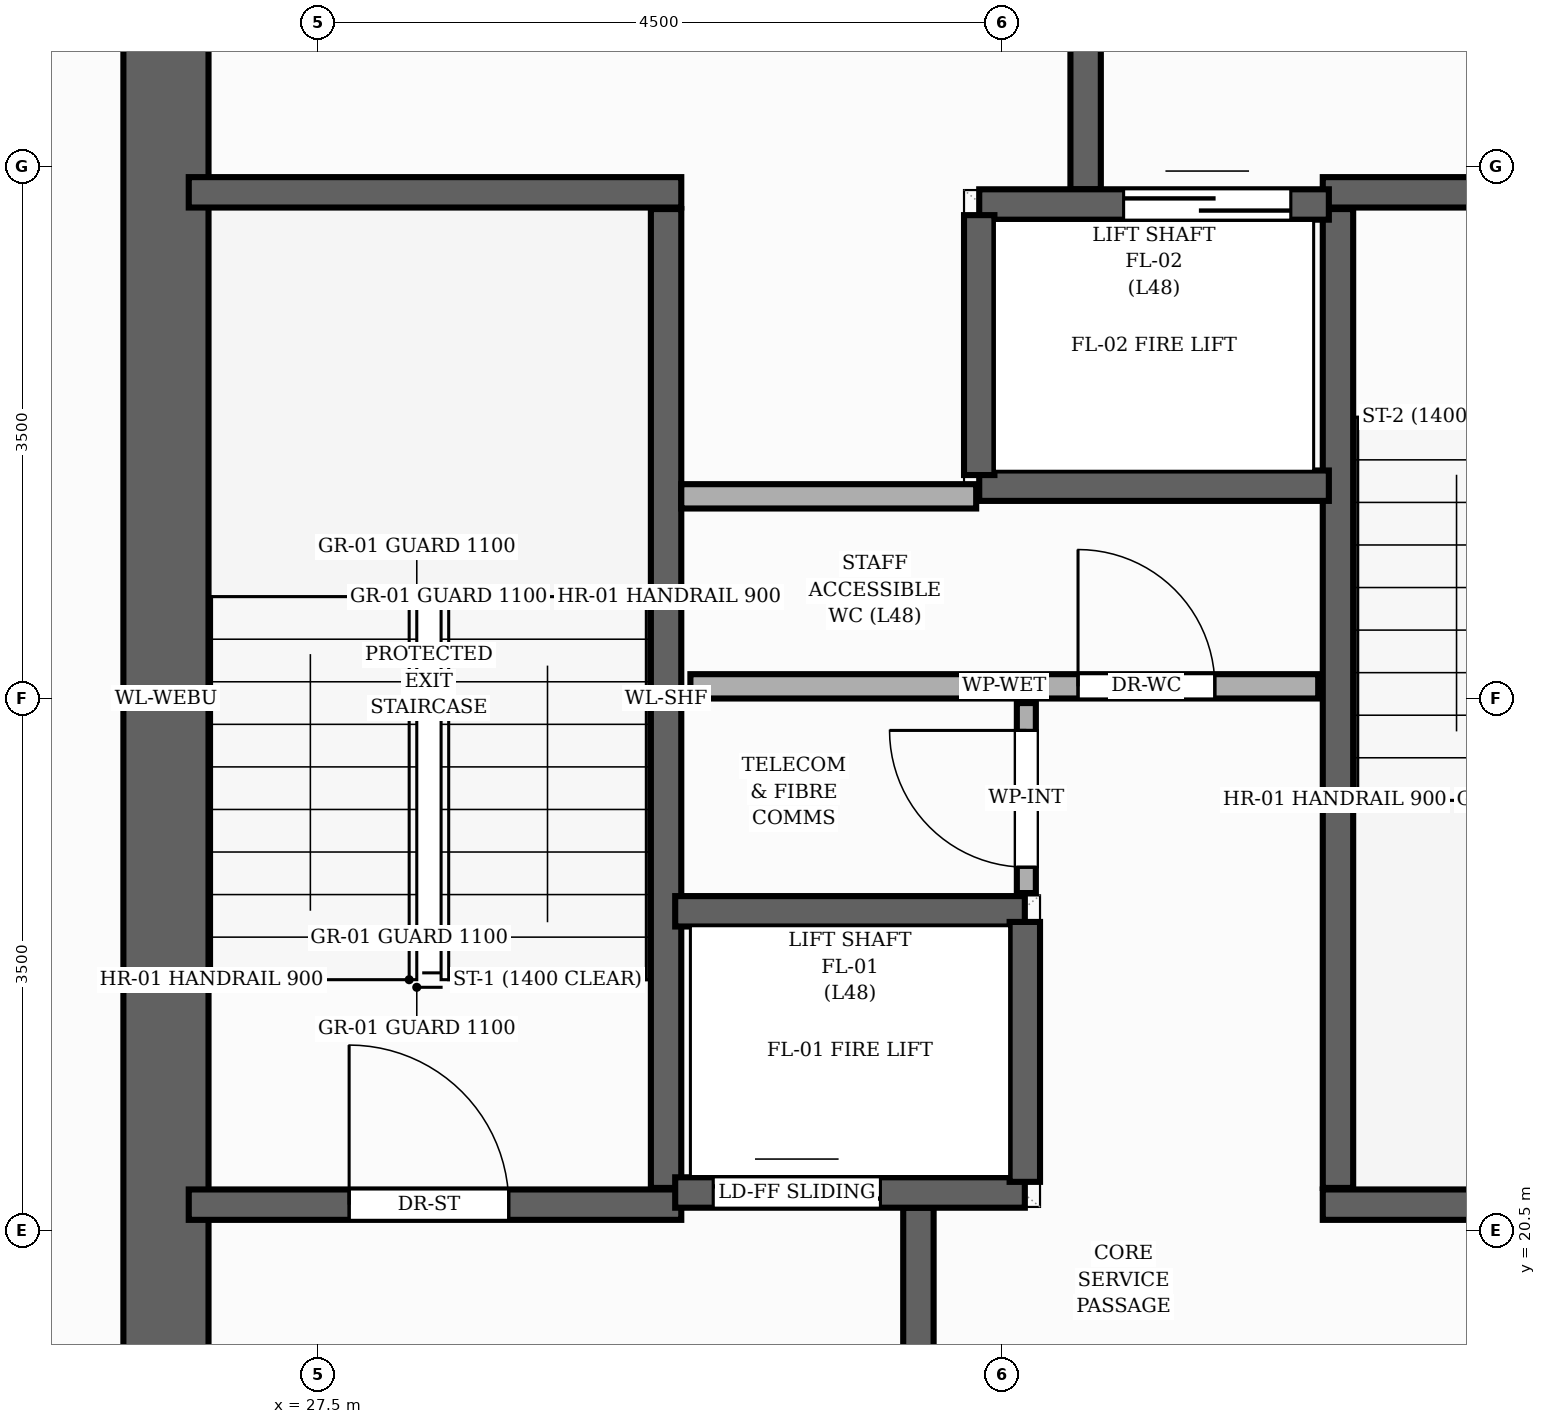
"""IFC4 building model, lengths in metres.
Left out: names, types, materials, properties, quantities, classifications, styles, units other than length and angle.
Written with IfcOpenShell. Run it as: python <this file> out.ifc"""

import sys

from ifc_helpers import new_model, si_unit, direction, frame, frame_2d, origin, place, context, subcontext, project, spatial, rectangle, extrude, element, fill, save


model = new_model("IFC4")
c1 = context("Model", 3, precision=1e-05, world=origin(), true_north=direction((0.0, 1.0)))
c2 = subcontext(c1, "Body", "Model", "MODEL_VIEW")
j1 = project(units=[si_unit("LENGTHUNIT", "METRE"), si_unit("PLANEANGLEUNIT", "RADIAN")], contexts=[c1])
p1 = place(None, origin())
s1 = spatial("IfcSite", under=j1, at=p1, CompositionType="ELEMENT")
p2 = place(p1, origin())
s2 = spatial("IfcBuilding", under=s1, at=p2, CompositionType="ELEMENT")
p3 = place(p2, frame((0.0, 0.0, 163.04)))
s3 = spatial("IfcBuildingStorey", under=s2, at=p3, CompositionType="ELEMENT", Elevation=163.04)
p4 = place(p3, frame((26.5, 17.3, 0.0), z_axis=(0.0, 0.0, 1.0), x_axis=(0.0, 1.0, 0.0)))
e1 = element("IfcWall", 1, at=p4, inside=s3, PredefinedType="SHEAR", context=c2, shape_type="SweptSolid", body=[
    extrude(rectangle(XDim=13.4, YDim=0.56, at=frame_2d((6.7, 0.0))), origin(), (0.0, 0.0, 1.0), 3.2),
])
p5 = place(p3, frame((29.79, 20.78, 0.0), z_axis=(0.0, 0.0, 1.0), x_axis=(0.0, 1.0, 0.0)))
e2 = element("IfcWall", 2, at=p5, inside=s3, PredefinedType="SHEAR", context=c2, shape_type="SweptSolid", body=[
    extrude(rectangle(XDim=6.44, YDim=0.2, at=frame_2d((3.22, 0.0))), origin(), (0.0, 0.0, 1.0), 3.2),
])
p6 = place(p3, frame((26.65, 27.33, 0.0), z_axis=(0.0, 0.0, 1.0), x_axis=(1.0, 0.0, 0.0)))
e3 = element("IfcWall", 3, at=p6, inside=s3, PredefinedType="SHEAR", context=c2, shape_type="SweptSolid", body=[
    extrude(rectangle(XDim=3.24, YDim=0.2, at=frame_2d((1.62, 0.0))), origin(), (0.0, 0.0, 1.0), 3.2),
])
p7 = place(p3, frame((26.65, 20.67, 0.0), z_axis=(0.0, 0.0, 1.0), x_axis=(1.0, 0.0, 0.0)))
e4 = element("IfcWall", 4, at=p7, inside=s3, PredefinedType="SHEAR", context=c2, shape_type="SweptSolid", body=[
    extrude(rectangle(XDim=3.24, YDim=0.2, at=frame_2d((1.62, 0.0))), origin(), (0.0, 0.0, 1.0), 3.2),
])
p8 = place(p7, frame((1.055, 0.0, 0.0)))
e5 = element("IfcOpeningElement", 5, at=p8, cuts=e4, PredefinedType="OPENING", context=c2, shape_type="SweptSolid", body=[
    extrude(rectangle(XDim=1.05, YDim=2.15, at=frame_2d((0.525, 1.075))), frame((0.0, 0.11, 0.0), z_axis=(0.0, -1.0, 0.0), x_axis=(1.0, 0.0, 0.0)), (0.0, 0.0, 1.0), 0.22),
])
p9 = place(p3, frame((34.21, 20.78, 0.0), z_axis=(0.0, 0.0, 1.0), x_axis=(0.0, 1.0, 0.0)))
e6 = element("IfcWall", 6, at=p9, inside=s3, PredefinedType="SHEAR", context=c2, shape_type="SweptSolid", body=[
    extrude(rectangle(XDim=6.44, YDim=0.2, at=frame_2d((3.22, 0.0))), origin(), (0.0, 0.0, 1.0), 3.2),
])
p10 = place(p3, frame((34.11, 20.67, 0.0), z_axis=(0.0, 0.0, 1.0), x_axis=(1.0, 0.0, 0.0)))
e7 = element("IfcWall", 7, at=p10, inside=s3, PredefinedType="SHEAR", context=c2, shape_type="SweptSolid", body=[
    extrude(rectangle(XDim=3.24, YDim=0.2, at=frame_2d((1.62, 0.0))), origin(), (0.0, 0.0, 1.0), 3.2),
])
p11 = place(p3, frame((34.11, 27.33, 0.0), z_axis=(0.0, 0.0, 1.0), x_axis=(1.0, 0.0, 0.0)))
e8 = element("IfcWall", 8, at=p11, inside=s3, PredefinedType="SHEAR", context=c2, shape_type="SweptSolid", body=[
    extrude(rectangle(XDim=3.24, YDim=0.2, at=frame_2d((1.62, 0.0))), origin(), (0.0, 0.0, 1.0), 3.2),
])
p12 = place(p11, frame((1.135, 0.0, 0.0)))
e9 = element("IfcOpeningElement", 9, at=p12, cuts=e8, PredefinedType="OPENING", context=c2, shape_type="SweptSolid", body=[
    extrude(rectangle(XDim=1.05, YDim=2.15, at=frame_2d((0.525, 1.075))), frame((0.0, 0.11, 0.0), z_axis=(0.0, -1.0, 0.0), x_axis=(1.0, 0.0, 0.0)), (0.0, 0.0, 1.0), 0.22),
])
for number, where, z_axis, x_axis in (
    (10, (31.45, 17.15, 0.0), (0.0, 0.0, 1.0), (0.0, 1.0, 0.0)),
    (11, (32.55, 27.35, 0.0), (0.0, 0.0, 1.0), (0.0, 1.0, 0.0)),
):
    element("IfcWall", number, at=place(p3, frame(where, z_axis=z_axis, x_axis=x_axis)), inside=s3, PredefinedType="SHEAR", context=c2, shape_type="SweptSolid", body=[
        extrude(rectangle(XDim=3.5, YDim=0.2, at=frame_2d((1.75, 0.0))), origin(), (0.0, 0.0, 1.0), 3.2),
    ])
p13 = place(p3, frame((29.85, 20.75, 0.0), z_axis=(0.0, 0.0, 1.0), x_axis=(1.0, 0.0, 0.0)))
e12 = element("IfcWall", 12, at=p13, inside=s3, PredefinedType="SHEAR", context=c2, shape_type="SweptSolid", body=[
    extrude(rectangle(XDim=2.3, YDim=0.2, at=frame_2d((1.15, 0.0))), origin(), (0.0, 0.0, 1.0), 3.2),
])
p14 = place(p13, frame((0.25, 0.0, 0.0)))
e13 = element("IfcOpeningElement", 13, at=p14, cuts=e12, PredefinedType="OPENING", context=c2, shape_type="SweptSolid", body=[
    extrude(rectangle(XDim=1.1, YDim=2.15, at=frame_2d((0.55, 1.075))), frame((0.0, 0.11, 0.0), z_axis=(0.0, -1.0, 0.0), x_axis=(1.0, 0.0, 0.0)), (0.0, 0.0, 1.0), 0.22),
])
p15 = place(p3, frame((29.85, 22.6, 0.0), z_axis=(0.0, 0.0, 1.0), x_axis=(1.0, 0.0, 0.0)))
e14 = element("IfcWall", 14, at=p15, inside=s3, PredefinedType="SHEAR", context=c2, shape_type="SweptSolid", body=[
    extrude(rectangle(XDim=2.3, YDim=0.2, at=frame_2d((1.15, 0.0))), origin(), (0.0, 0.0, 1.0), 3.2),
])
p16 = place(p3, frame((32.15, 20.82, 0.0), z_axis=(0.0, 0.0, 1.0), x_axis=(0.0, 1.0, 0.0)))
e15 = element("IfcWall", 15, at=p16, inside=s3, PredefinedType="SHEAR", context=c2, shape_type="SweptSolid", body=[
    extrude(rectangle(XDim=1.71, YDim=0.2, at=frame_2d((0.855, 0.0))), origin(), (0.0, 0.0, 1.0), 3.2),
])
p17 = place(p3, frame((31.85, 27.25, 0.0), z_axis=(0.0, 0.0, 1.0), x_axis=(1.0, 0.0, 0.0)))
e16 = element("IfcWall", 16, at=p17, inside=s3, PredefinedType="SHEAR", context=c2, shape_type="SweptSolid", body=[
    extrude(rectangle(XDim=2.3, YDim=0.2, at=frame_2d((1.15, 0.0))), origin(), (0.0, 0.0, 1.0), 3.2),
])
p18 = place(p17, frame((0.95, 0.0, 0.0)))
e17 = element("IfcOpeningElement", 17, at=p18, cuts=e16, PredefinedType="OPENING", context=c2, shape_type="SweptSolid", body=[
    extrude(rectangle(XDim=1.1, YDim=2.15, at=frame_2d((0.55, 1.075))), frame((0.0, 0.11, 0.0), z_axis=(0.0, -1.0, 0.0), x_axis=(1.0, 0.0, 0.0)), (0.0, 0.0, 1.0), 0.22),
])
p19 = place(p3, frame((31.85, 25.4, 0.0), z_axis=(0.0, 0.0, 1.0), x_axis=(1.0, 0.0, 0.0)))
e18 = element("IfcWall", 18, at=p19, inside=s3, PredefinedType="SHEAR", context=c2, shape_type="SweptSolid", body=[
    extrude(rectangle(XDim=2.3, YDim=0.2, at=frame_2d((1.15, 0.0))), origin(), (0.0, 0.0, 1.0), 3.2),
])
p20 = place(p3, frame((31.85, 25.47, 0.0), z_axis=(0.0, 0.0, 1.0), x_axis=(0.0, 1.0, 0.0)))
e19 = element("IfcWall", 19, at=p20, inside=s3, PredefinedType="SHEAR", context=c2, shape_type="SweptSolid", body=[
    extrude(rectangle(XDim=1.71, YDim=0.2, at=frame_2d((0.855, 0.0))), origin(), (0.0, 0.0, 1.0), 3.2),
])
p21 = place(p3, frame((29.95, 24.08, 0.0), z_axis=(0.0, 0.0, 1.0), x_axis=(1.0, 0.0, 0.0)))
e20 = element("IfcWall", 20, at=p21, inside=s3, PredefinedType="PLUMBINGWALL", context=c2, shape_type="SweptSolid", body=[
    extrude(rectangle(XDim=4.13, YDim=0.16, at=frame_2d((2.065, 0.0))), origin(), (0.0, 0.0, 1.0), 2.955),
])
p22 = place(p21, frame((2.55, 0.0, 0.0)))
e21 = element("IfcOpeningElement", 21, at=p22, cuts=e20, PredefinedType="OPENING", context=c2, shape_type="SweptSolid", body=[
    extrude(rectangle(XDim=0.9, YDim=2.1, at=frame_2d((0.45, 1.05))), frame((0.0, 0.09, 0.0), z_axis=(0.0, -1.0, 0.0), x_axis=(1.0, 0.0, 0.0)), (0.0, 0.0, 1.0), 0.18),
])
p23 = place(p3, frame((32.16, 22.72, 0.0), z_axis=(0.0, 0.0, 1.0), x_axis=(0.0, 1.0, 0.0)))
e22 = element("IfcWall", 22, at=p23, inside=s3, PredefinedType="PARTITIONING", context=c2, shape_type="SweptSolid", body=[
    extrude(rectangle(XDim=1.25, YDim=0.125, at=frame_2d((0.625, 0.0))), origin(), (0.0, 0.0, 1.0), 2.955),
])
p24 = place(p23, frame((0.17, 0.0, 0.0)))
e23 = element("IfcOpeningElement", 23, at=p24, cuts=e22, PredefinedType="OPENING", context=c2, shape_type="SweptSolid", body=[
    extrude(rectangle(XDim=0.9, YDim=2.1, at=frame_2d((0.45, 1.05))), frame((0.0, 0.073, 0.0), z_axis=(0.0, -1.0, 0.0), x_axis=(1.0, 0.0, 0.0)), (0.0, 0.0, 1.0), 0.145),
])
p25 = place(p3, frame((29.89, 25.33, 0.0), z_axis=(0.0, 0.0, 1.0), x_axis=(1.0, 0.0, 0.0)))
e24 = element("IfcWall", 24, at=p25, inside=s3, PredefinedType="PLUMBINGWALL", context=c2, shape_type="SweptSolid", body=[
    extrude(rectangle(XDim=1.94, YDim=0.16, at=frame_2d((0.97, 0.0))), origin(), (0.0, 0.0, 1.0), 2.955),
])
p26 = place(p8, origin())
e25 = element("IfcDoor", 25, at=p26, inside=s3, OperationType="SINGLE_SWING_LEFT", PredefinedType="DOOR", context=c2, shape_type="SweptSolid", body=[
    extrude(rectangle(XDim=1.05, YDim=2.15, at=frame_2d((0.525, 1.075))), frame((0.0, 0.025, 0.0), z_axis=(0.0, -1.0, 0.0), x_axis=(1.0, 0.0, 0.0)), (0.0, 0.0, 1.0), 0.05),
])
fill(e5, e25)
p27 = place(p14, origin())
e26 = element("IfcDoor", 26, at=p27, inside=s3, OperationType="DOUBLE_DOOR_SLIDING", PredefinedType="DOOR", context=c2, shape_type="SweptSolid", body=[
    extrude(rectangle(XDim=1.1, YDim=2.15, at=frame_2d((0.55, 1.075))), frame((0.0, 0.025, 0.0), z_axis=(0.0, -1.0, 0.0), x_axis=(1.0, 0.0, 0.0)), (0.0, 0.0, 1.0), 0.05),
])
fill(e13, e26)
p28 = place(p18, origin())
e27 = element("IfcDoor", 27, at=p28, inside=s3, OperationType="DOUBLE_DOOR_SLIDING", PredefinedType="DOOR", context=c2, shape_type="SweptSolid", body=[
    extrude(rectangle(XDim=1.1, YDim=2.15, at=frame_2d((0.55, 1.075))), frame((0.0, 0.025, 0.0), z_axis=(0.0, -1.0, 0.0), x_axis=(1.0, 0.0, 0.0)), (0.0, 0.0, 1.0), 0.05),
])
fill(e17, e27)
p29 = place(p22, origin())
e28 = element("IfcDoor", 28, at=p29, inside=s3, OperationType="SINGLE_SWING_LEFT", PredefinedType="DOOR", context=c2, shape_type="SweptSolid", body=[
    extrude(rectangle(XDim=0.9, YDim=2.1, at=frame_2d((0.45, 1.05))), frame((0.0, 0.025, 0.0), z_axis=(0.0, -1.0, 0.0), x_axis=(1.0, 0.0, 0.0)), (0.0, 0.0, 1.0), 0.05),
])
fill(e21, e28)
p30 = place(p24, origin())
e29 = element("IfcDoor", 29, at=p30, inside=s3, OperationType="SINGLE_SWING_RIGHT", PredefinedType="DOOR", context=c2, shape_type="SweptSolid", body=[
    extrude(rectangle(XDim=0.9, YDim=2.1, at=frame_2d((0.45, 1.05))), frame((0.0, 0.025, 0.0), z_axis=(0.0, -1.0, 0.0), x_axis=(1.0, 0.0, 0.0)), (0.0, 0.0, 1.0), 0.05),
])
fill(e23, e29)
save(model, sys.argv[1])
